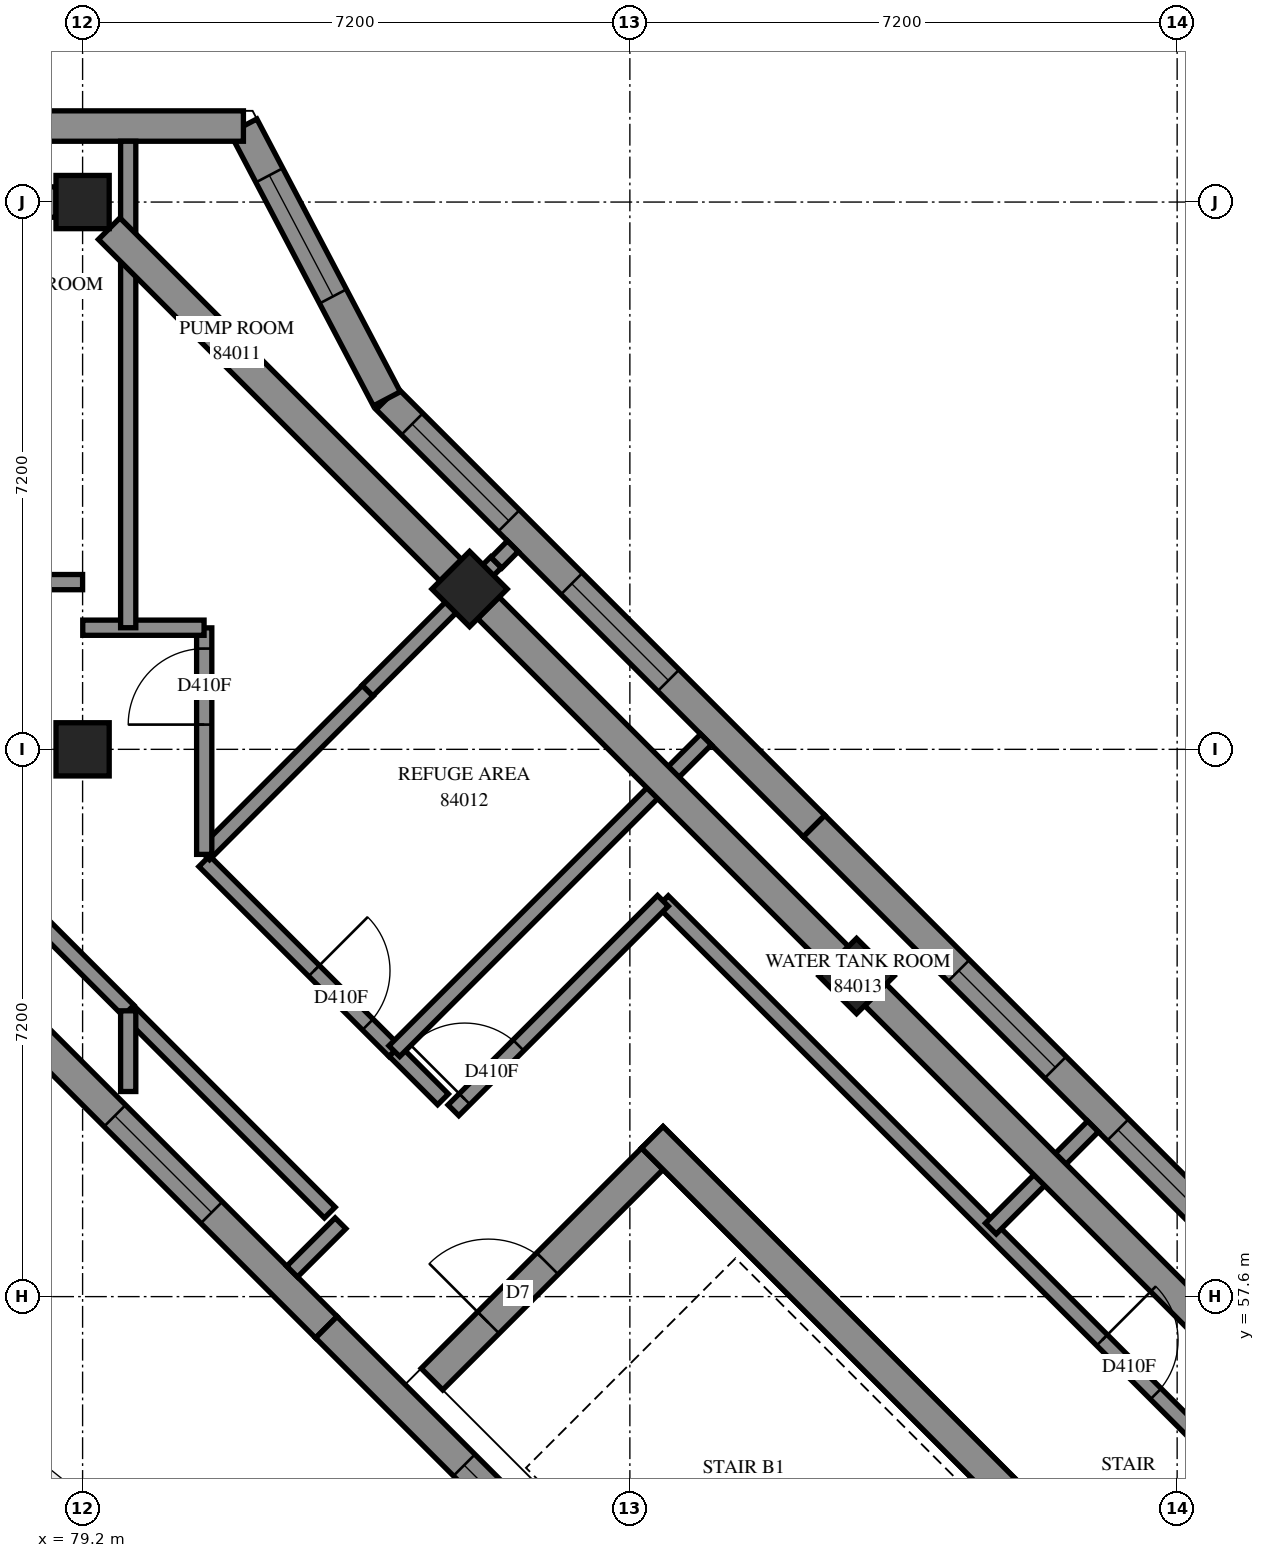
"""IFC4 building model, lengths in metres.
Left out: names, types, materials, properties, quantities, classifications, styles, units other than length and angle.
Written with IfcOpenShell. Run it as: python <this file> out.ifc"""

import sys

from ifc_helpers import new_model, si_unit, direction, frame, frame_2d, origin, origin_2d, place, context, subcontext, project, spatial, polyline, rectangle, outline, extrude, element, fill, save


model = new_model("IFC4")
c1 = context("Model", 3, precision=1e-05, world=origin(), true_north=direction((0.0, 1.0)))
c2 = subcontext(c1, "Body", "Model", "MODEL_VIEW")
j1 = project(units=[si_unit("LENGTHUNIT", "METRE"), si_unit("PLANEANGLEUNIT", "RADIAN")], contexts=[c1])
p1 = place(None, origin())
s1 = spatial("IfcSite", under=j1, at=p1, CompositionType="ELEMENT")
p2 = place(p1, origin())
s2 = spatial("IfcBuilding", under=s1, at=p2, CompositionType="ELEMENT")
p3 = place(p2, frame((0.0, 0.0, 309.6)))
s3 = spatial("IfcBuildingStorey", under=s2, at=p3, CompositionType="ELEMENT", Elevation=309.6)
for number, where, z_axis, x_axis in (
    (1, (79.2, 64.8, 0.0), (0.0, 0.0, 1.0), (1.0, 0.0, 0.0)),
    (2, (79.2, 72.0, 0.0), (0.0, 0.0, 1.0), (1.0, 0.0, 0.0)),
    (3, (84.291, 66.909, 0.0), (0.0, 0.0, 1.0), (0.707, -0.707, 0.0)),
    (4, (89.382, 61.818, 0.0), (0.0, 0.0, 1.0), (0.707, -0.707, 0.0)),
):
    element("IfcColumn", number, at=place(p3, frame(where, z_axis=z_axis, x_axis=x_axis)), inside=s3, PredefinedType="COLUMN", context=c2, shape_type="SweptSolid", body=[
        extrude(rectangle(XDim=0.7, YDim=0.7, at=origin_2d()), origin(), (0.0, 0.0, 1.0), 3.5),
    ])
p4 = place(p3, frame((86.695, 59.696, -0.3), z_axis=(0.0, 0.0, 1.0), x_axis=(0.7071100706, -0.7071034917, 0.0)))
e5 = element("IfcWall", 5, at=p4, inside=s3, PredefinedType="SHEAR", context=c2, shape_type="SweptSolid", body=[
    extrude(outline(polyline([(0.0, 0.0), (15.2, 0.0), (15.2, 3.1), (0.0, 3.1), (0.0, 0.0)])), frame((0.0, 0.2, 0.0), z_axis=(0.0, -1.0, 0.0), x_axis=(1.0, 0.0, 0.0)), (0.0, 0.0, 1.0), 0.4),
])
p5 = place(p4, frame((10.4, 0.0, 0.3)))
e6 = element("IfcOpeningElement", 6, at=p5, cuts=e5, PredefinedType="OPENING", context=c2, shape_type="SweptSolid", body=[
    extrude(rectangle(XDim=0.8, YDim=2.1, at=frame_2d((0.4, 1.05))), frame((0.0, 0.21, 0.0), z_axis=(0.0, -1.0, 0.0), x_axis=(1.0, 0.0, 0.0)), (0.0, 0.0, 1.0), 0.42),
])
p6 = place(p3, frame((83.796, 56.514, -0.3), z_axis=(0.0, 0.0, 1.0), x_axis=(0.7071067812, 0.7071067812, 0.0)))
e7 = element("IfcWall", 7, at=p6, inside=s3, PredefinedType="SHEAR", context=c2, shape_type="SweptSolid", body=[
    extrude(outline(polyline([(0.0, 0.0), (4.1, 0.0), (4.1, 3.1), (0.0, 3.1), (0.0, 0.0)])), frame((0.0, 0.2, 0.0), z_axis=(0.0, -1.0, 0.0), x_axis=(1.0, 0.0, 0.0)), (0.0, 0.0, 1.0), 0.4),
])
p7 = place(p6, frame((1.05, 0.0, 0.3)))
e8 = element("IfcOpeningElement", 8, at=p7, cuts=e7, PredefinedType="OPENING", context=c2, shape_type="SweptSolid", body=[
    extrude(rectangle(XDim=1.1, YDim=2.1, at=frame_2d((0.55, 1.05))), frame((0.0, 0.21, 0.0), z_axis=(0.0, -1.0, 0.0), x_axis=(1.0, 0.0, 0.0)), (0.0, 0.0, 1.0), 0.42),
])
p8 = place(p3, frame((94.42, 58.194, 0.0), z_axis=(0.0, 0.0, 1.0), x_axis=(-0.7071067812, 0.7071067812, 0.0)))
e9 = element("IfcWall", 9, at=p8, inside=s3, PredefinedType="SOLIDWALL", context=c2, shape_type="SweptSolid", body=[
    extrude(outline(polyline([(0.0, -0.2), (7.917, -0.2), (7.917, 0.2), (0.0, 0.2), (0.0, -0.2)])), origin(), (0.0, 0.0, 1.0), 3.5),
])
p9 = place(p8, frame((0.462, 0.0, 0.7)))
e10 = element("IfcOpeningElement", 10, at=p9, cuts=e9, PredefinedType="OPENING", context=c2, shape_type="SweptSolid", body=[
    extrude(rectangle(XDim=1.8, YDim=2.2, at=frame_2d((0.9, 1.1))), frame((0.0, 0.21, 0.0), z_axis=(0.0, -1.0, 0.0), x_axis=(1.0, 0.0, 0.0)), (0.0, 0.0, 1.0), 0.42),
])
p10 = place(p8, frame((3.425, 0.0, 0.7)))
e11 = element("IfcOpeningElement", 11, at=p10, cuts=e9, PredefinedType="OPENING", context=c2, shape_type="SweptSolid", body=[
    extrude(rectangle(XDim=1.8, YDim=2.2, at=frame_2d((0.9, 1.1))), frame((0.0, 0.21, 0.0), z_axis=(0.0, -1.0, 0.0), x_axis=(1.0, 0.0, 0.0)), (0.0, 0.0, 1.0), 0.42),
])
p11 = place(p3, frame((88.822, 63.792, 0.0), z_axis=(0.0, 0.0, 1.0), x_axis=(-0.7071130728, 0.7071004896, 0.0)))
e12 = element("IfcWall", 12, at=p11, inside=s3, PredefinedType="SOLIDWALL", context=c2, shape_type="SweptSolid", body=[
    extrude(outline(polyline([(0.0, -0.2), (7.917, -0.2), (7.978, 0.2), (0.0, 0.2), (0.0, -0.2)])), origin(), (0.0, 0.0, 1.0), 3.5),
])
p12 = place(p11, frame((2.708, 0.0, 0.7)))
e13 = element("IfcOpeningElement", 13, at=p12, cuts=e12, PredefinedType="OPENING", context=c2, shape_type="SweptSolid", body=[
    extrude(rectangle(XDim=1.8, YDim=2.2, at=frame_2d((0.9, 1.1))), frame((0.0, 0.21, 0.0), z_axis=(0.0, -1.0, 0.0), x_axis=(1.0, 0.0, 0.0)), (0.0, 0.0, 1.0), 0.42),
])
p13 = place(p11, frame((5.678, 0.0, 0.7)))
e14 = element("IfcOpeningElement", 14, at=p13, cuts=e12, PredefinedType="OPENING", context=c2, shape_type="SweptSolid", body=[
    extrude(rectangle(XDim=1.8, YDim=2.2, at=frame_2d((0.9, 1.1))), frame((0.0, 0.21, 0.0), z_axis=(0.0, -1.0, 0.0), x_axis=(1.0, 0.0, 0.0)), (0.0, 0.0, 1.0), 0.42),
])
p14 = place(p3, frame((83.203, 69.411, 0.0), z_axis=(0.0, 0.0, 1.0), x_axis=(-0.465420108, 0.8850898955, 0.0)))
e15 = element("IfcWall", 15, at=p14, inside=s3, PredefinedType="SOLIDWALL", context=c2, shape_type="SweptSolid", body=[
    extrude(outline(polyline([(0.03, -0.2), (4.175, -0.2), (3.934, 0.2), (-0.03, 0.2), (0.03, -0.2)])), origin(), (0.0, 0.0, 1.0), 3.5),
])
p15 = place(p14, frame((1.522, 0.0, 0.7)))
e16 = element("IfcOpeningElement", 16, at=p15, cuts=e15, PredefinedType="OPENING", context=c2, shape_type="SweptSolid", body=[
    extrude(rectangle(XDim=1.8, YDim=2.2, at=frame_2d((0.9, 1.1))), frame((0.0, 0.21, 0.0), z_axis=(0.0, -1.0, 0.0), x_axis=(1.0, 0.0, 0.0)), (0.0, 0.0, 1.0), 0.42),
])
p16 = place(p3, frame((81.316, 73.0, 0.0), z_axis=(0.0, 0.0, 1.0), x_axis=(-1.0, 0.0, 0.0)))
e17 = element("IfcWall", 17, at=p16, inside=s3, PredefinedType="SOLIDWALL", context=c2, shape_type="SweptSolid", body=[
    extrude(outline(polyline([(-0.121, -0.2), (11.749, -0.2), (11.349, 0.2), (0.121, 0.2), (-0.121, -0.2)])), origin(), (0.0, 0.0, 1.0), 3.5),
])
p17 = place(p16, frame((3.166, 0.0, 0.7)))
e18 = element("IfcOpeningElement", 18, at=p17, cuts=e17, PredefinedType="OPENING", context=c2, shape_type="SweptSolid", body=[
    extrude(rectangle(XDim=1.8, YDim=2.2, at=frame_2d((0.9, 1.1))), frame((0.0, 0.21, 0.0), z_axis=(0.0, -1.0, 0.0), x_axis=(1.0, 0.0, 0.0)), (0.0, 0.0, 1.0), 0.42),
])
p18 = place(p16, frame((6.416, 0.0, 0.7)))
e19 = element("IfcOpeningElement", 19, at=p18, cuts=e17, PredefinedType="OPENING", context=c2, shape_type="SweptSolid", body=[
    extrude(rectangle(XDim=1.8, YDim=2.2, at=frame_2d((0.9, 1.1))), frame((0.0, 0.21, 0.0), z_axis=(0.0, -1.0, 0.0), x_axis=(1.0, 0.0, 0.0)), (0.0, 0.0, 1.0), 0.42),
])
p19 = place(p3, frame((77.439, 62.164, 0.0), z_axis=(0.0, 0.0, 1.0), x_axis=(0.7071067812, -0.7071067812, 0.0)))
e20 = element("IfcWall", 20, at=p19, inside=s3, PredefinedType="SOLIDWALL", context=c2, shape_type="SweptSolid", body=[
    extrude(outline(polyline([(0.034, -0.2), (7.024, -0.2), (7.024, 0.2), (-0.034, 0.2), (0.034, -0.2)])), origin(), (0.0, 0.0, 1.0), 3.5),
])
p20 = place(p19, frame((3.09, 0.0, 0.7)))
e21 = element("IfcOpeningElement", 21, at=p20, cuts=e20, PredefinedType="OPENING", context=c2, shape_type="SweptSolid", body=[
    extrude(rectangle(XDim=1.8, YDim=2.2, at=frame_2d((0.9, 1.1))), frame((0.0, 0.21, 0.0), z_axis=(0.0, -1.0, 0.0), x_axis=(1.0, 0.0, 0.0)), (0.0, 0.0, 1.0), 0.42),
])
p21 = place(p3, frame((82.406, 57.197, 0.0), z_axis=(0.0, 0.0, 1.0), x_axis=(0.7071067812, -0.7071067812, 0.0)))
e22 = element("IfcWall", 22, at=p21, inside=s3, PredefinedType="SOLIDWALL", context=c2, shape_type="SweptSolid", body=[
    extrude(outline(polyline([(0.0, -0.2), (6.99, -0.2), (6.99, 0.2), (0.0, 0.2), (0.0, -0.2)])), origin(), (0.0, 0.0, 1.0), 3.5),
])
p22 = place(p21, frame((2.565, 0.0, 0.7)))
e23 = element("IfcOpeningElement", 23, at=p22, cuts=e22, PredefinedType="OPENING", context=c2, shape_type="SweptSolid", body=[
    extrude(rectangle(XDim=1.8, YDim=2.2, at=frame_2d((0.9, 1.1))), frame((0.0, 0.21, 0.0), z_axis=(0.0, -1.0, 0.0), x_axis=(1.0, 0.0, 0.0)), (0.0, 0.0, 1.0), 0.42),
])
p23 = place(p3, frame((86.835, 62.803, 0.0), z_axis=(0.0, 0.0, 1.0), x_axis=(0.7072045346, -0.7070090143, 0.0)))
e24 = element("IfcWall", 24, at=p23, inside=s3, PredefinedType="PARTITIONING", context=c2, shape_type="SweptSolid", body=[
    extrude(rectangle(XDim=13.298, YDim=0.2, at=frame_2d((6.649, 0.0))), origin(), (0.0, 0.0, 1.0), 3.5),
])
p24 = place(p23, frame((8.169, 0.0, 0.0)))
e25 = element("IfcOpeningElement", 25, at=p24, cuts=e24, PredefinedType="OPENING", context=c2, shape_type="SweptSolid", body=[
    extrude(rectangle(XDim=1.0, YDim=2.1, at=frame_2d((0.5, 1.05))), frame((0.0, 0.11, 0.0), z_axis=(0.0, -1.0, 0.0), x_axis=(1.0, 0.0, 0.0)), (0.0, 0.0, 1.0), 0.22),
])
p25 = place(p3, frame((84.079, 60.051, 0.0), z_axis=(0.0, 0.0, 1.0), x_axis=(0.7071067812, 0.7071067812, 0.0)))
e26 = element("IfcWall", 26, at=p25, inside=s3, PredefinedType="PARTITIONING", context=c2, shape_type="SweptSolid", body=[
    extrude(rectangle(XDim=3.898, YDim=0.2, at=frame_2d((1.949, 0.0))), origin(), (0.0, 0.0, 1.0), 3.5),
])
p26 = place(p25, frame((0.209, 0.0, 0.0)))
e27 = element("IfcOpeningElement", 27, at=p26, cuts=e26, PredefinedType="OPENING", context=c2, shape_type="SweptSolid", body=[
    extrude(rectangle(XDim=1.0, YDim=2.1, at=frame_2d((0.5, 1.05))), frame((0.0, 0.11, 0.0), z_axis=(0.0, -1.0, 0.0), x_axis=(1.0, 0.0, 0.0)), (0.0, 0.0, 1.0), 0.22),
])
p27 = place(p3, frame((79.8, 61.36, 0.0), z_axis=(0.0, 0.0, 1.0), x_axis=(0.7068402, -0.707373262, 0.0)))
e28 = element("IfcWall", 28, at=p27, inside=s3, PredefinedType="PARTITIONING", context=c2, shape_type="SweptSolid", body=[
    extrude(rectangle(XDim=3.752, YDim=0.2, at=frame_2d((1.876, 0.0))), origin(), (0.0, 0.0, 1.0), 3.5),
])
p28 = place(p3, frame((80.801, 63.329, 0.0), z_axis=(0.0, 0.0, 1.0), x_axis=(0.7073894543, -0.7068239951, 0.0)))
e29 = element("IfcWall", 29, at=p28, inside=s3, PredefinedType="PARTITIONING", context=c2, shape_type="SweptSolid", body=[
    extrude(rectangle(XDim=3.537, YDim=0.2, at=frame_2d((1.768, 0.0))), origin(), (0.0, 0.0, 1.0), 3.5),
])
p29 = place(p28, frame((2.041, 0.0, 0.0)))
e30 = element("IfcOpeningElement", 30, at=p29, cuts=e29, PredefinedType="OPENING", context=c2, shape_type="SweptSolid", body=[
    extrude(rectangle(XDim=1.0, YDim=2.1, at=frame_2d((0.5, 1.05))), frame((0.0, 0.11, 0.0), z_axis=(0.0, -1.0, 0.0), x_axis=(1.0, 0.0, 0.0)), (0.0, 0.0, 1.0), 0.22),
])
p30 = place(p3, frame((80.799, 63.419, 0.0), z_axis=(0.0, 0.0, 1.0), x_axis=(0.7071067812, 0.7071067812, 0.0)))
e31 = element("IfcWall", 31, at=p30, inside=s3, PredefinedType="PARTITIONING", context=c2, shape_type="SweptSolid", body=[
    extrude(rectangle(XDim=3.043, YDim=0.2, at=frame_2d((1.522, 0.0))), origin(), (0.0, 0.0, 1.0), 3.5),
])
p31 = place(p3, frame((80.8, 63.418, 0.0), z_axis=(0.0, 0.0, 1.0), x_axis=(0.0, 1.0, 0.0)))
e32 = element("IfcWall", 32, at=p31, inside=s3, PredefinedType="PARTITIONING", context=c2, shape_type="SweptSolid", body=[
    extrude(rectangle(XDim=2.98, YDim=0.2, at=frame_2d((1.49, 0.0))), origin(), (0.0, 0.0, 1.0), 3.5),
])
p32 = place(p31, frame((1.708, 0.0, 0.0)))
e33 = element("IfcOpeningElement", 33, at=p32, cuts=e32, PredefinedType="OPENING", context=c2, shape_type="SweptSolid", body=[
    extrude(rectangle(XDim=1.0, YDim=2.1, at=frame_2d((0.5, 1.05))), frame((0.0, 0.11, 0.0), z_axis=(0.0, -1.0, 0.0), x_axis=(1.0, 0.0, 0.0)), (0.0, 0.0, 1.0), 0.22),
])
p33 = place(p3, frame((77.603, 63.563, 0.0), z_axis=(0.0, 0.0, 1.0), x_axis=(0.7071067812, -0.7071067812, 0.0)))
e34 = element("IfcWall", 34, at=p33, inside=s3, PredefinedType="PARTITIONING", context=c2, shape_type="SweptSolid", body=[
    extrude(rectangle(XDim=3.111, YDim=0.2, at=frame_2d((1.556, 0.0))), origin(), (0.0, 0.0, 1.0), 3.5),
])
p34 = place(p3, frame((77.13, 67.0, 0.0), z_axis=(0.0, 0.0, 1.0), x_axis=(1.0, 0.0, 0.0)))
e35 = element("IfcWall", 35, at=p34, inside=s3, PredefinedType="PARTITIONING", context=c2, shape_type="SweptSolid", body=[
    extrude(rectangle(XDim=2.07, YDim=0.2, at=frame_2d((1.035, 0.0))), origin(), (0.0, 0.0, 1.0), 3.5),
])
p35 = place(p3, frame((79.8, 60.298, 0.0), z_axis=(0.0, 0.0, 1.0), x_axis=(0.0, 1.0, 0.0)))
e36 = element("IfcWall", 36, at=p35, inside=s3, PredefinedType="PARTITIONING", context=c2, shape_type="SweptSolid", body=[
    extrude(rectangle(XDim=1.062, YDim=0.2, at=frame_2d((0.531, 0.0))), origin(), (0.0, 0.0, 1.0), 3.5),
])
p36 = place(p3, frame((79.202, 66.4, 0.0), z_axis=(0.0, 0.0, 1.0), x_axis=(1.0, 0.0, 0.0)))
e37 = element("IfcWall", 37, at=p36, inside=s3, PredefinedType="PARTITIONING", context=c2, shape_type="SweptSolid", body=[
    extrude(rectangle(XDim=1.596, YDim=0.2, at=frame_2d((0.798, 0.0))), origin(), (0.0, 0.0, 1.0), 3.5),
])
p37 = place(p3, frame((82.949, 65.573, 0.0), z_axis=(0.0, 0.0, 1.0), x_axis=(0.7078390676, 0.7063737356, 0.0)))
e38 = element("IfcWall", 38, at=p37, inside=s3, PredefinedType="PARTITIONING", context=c2, shape_type="SweptSolid", body=[
    extrude(rectangle(XDim=2.389, YDim=0.2, at=frame_2d((1.194, 0.0))), origin(), (0.0, 0.0, 1.0), 3.5),
])
p38 = place(p3, frame((83.305, 60.831, 0.0), z_axis=(0.0, 0.0, 1.0), x_axis=(0.7071067812, -0.7071067812, 0.0)))
e39 = element("IfcWall", 39, at=p38, inside=s3, PredefinedType="PARTITIONING", context=c2, shape_type="SweptSolid", body=[
    extrude(rectangle(XDim=0.899, YDim=0.2, at=frame_2d((0.45, 0.0))), origin(), (0.0, 0.0, 1.0), 3.5),
])
p39 = place(p3, frame((79.8, 66.4, 0.0), z_axis=(0.0, 0.0, 1.0), x_axis=(0.0, 1.0, 0.0)))
e40 = element("IfcWall", 40, at=p39, inside=s3, PredefinedType="PARTITIONING", context=c2, shape_type="SweptSolid", body=[
    extrude(outline(polyline([(0.0, -0.1), (6.4, -0.1), (6.4, 0.1), (0.0, 0.1), (0.0, -0.1)])), origin(), (0.0, 0.0, 1.0), 3.5),
])
p40 = place(p3, frame((83.301, 60.829, 0.0), z_axis=(0.0, 0.0, 1.0), x_axis=(0.7071067812, 0.7071067812, 0.0)))
e41 = element("IfcWall", 41, at=p40, inside=s3, PredefinedType="PARTITIONING", context=c2, shape_type="SweptSolid", body=[
    extrude(outline(polyline([(0.0, -0.1), (5.799, -0.1), (5.799, 0.1), (0.0, 0.1), (0.0, -0.1)])), origin(), (0.0, 0.0, 1.0), 3.5),
])
p41 = place(p3, frame((91.149, 58.495, 0.0), z_axis=(0.0, 0.0, 1.0), x_axis=(0.7071067812, 0.7071067812, 0.0)))
e42 = element("IfcWall", 42, at=p41, inside=s3, PredefinedType="PARTITIONING", context=c2, shape_type="SweptSolid", body=[
    extrude(outline(polyline([(0.0, -0.1), (1.9, -0.1), (1.9, 0.1), (0.0, 0.1), (0.0, -0.1)])), origin(), (0.0, 0.0, 1.0), 3.5),
])
p42 = place(p3, frame((81.957, 57.93, 0.0), z_axis=(0.0, 0.0, 1.0), x_axis=(0.7079403378, 0.7062722408, 0.0)))
e43 = element("IfcWall", 43, at=p42, inside=s3, PredefinedType="PARTITIONING", context=c2, shape_type="SweptSolid", body=[
    extrude(outline(polyline([(0.0, -0.1), (0.899, -0.1), (0.899, 0.1), (0.0, 0.1), (0.0, -0.1)])), origin(), (0.0, 0.0, 1.0), 3.5),
])
p43 = place(p3, frame((84.645, 67.255, 0.0), z_axis=(0.0, 0.0, 1.0), x_axis=(0.7053018997, 0.7089070674, 0.0)))
e44 = element("IfcWall", 44, at=p43, inside=s3, PredefinedType="PARTITIONING", context=c2, shape_type="SweptSolid", body=[
    extrude(outline(polyline([(0.0, -0.1), (0.305, -0.1), (0.305, 0.1), (0.0, 0.1), (0.0, -0.1)])), origin(), (0.0, 0.0, 1.0), 3.5),
])
p44 = place(p9, origin())
e45 = element("IfcWindow", 45, at=p44, inside=s3, PartitioningType="SINGLE_PANEL", PredefinedType="WINDOW", context=c2, shape_type="SweptSolid", body=[
    extrude(rectangle(XDim=1.8, YDim=2.2, at=frame_2d((0.9, 1.1))), frame((0.0, 0.08, 0.0), z_axis=(0.0, -1.0, 0.0), x_axis=(1.0, 0.0, 0.0)), (0.0, 0.0, 1.0), 0.06),
])
fill(e10, e45)
p45 = place(p10, origin())
e46 = element("IfcWindow", 46, at=p45, inside=s3, PartitioningType="SINGLE_PANEL", PredefinedType="WINDOW", context=c2, shape_type="SweptSolid", body=[
    extrude(rectangle(XDim=1.8, YDim=2.2, at=frame_2d((0.9, 1.1))), frame((0.0, 0.08, 0.0), z_axis=(0.0, -1.0, 0.0), x_axis=(1.0, 0.0, 0.0)), (0.0, 0.0, 1.0), 0.06),
])
fill(e11, e46)
p46 = place(p12, origin())
e47 = element("IfcWindow", 47, at=p46, inside=s3, PartitioningType="SINGLE_PANEL", PredefinedType="WINDOW", context=c2, shape_type="SweptSolid", body=[
    extrude(rectangle(XDim=1.8, YDim=2.2, at=frame_2d((0.9, 1.1))), frame((0.0, 0.08, 0.0), z_axis=(0.0, -1.0, 0.0), x_axis=(1.0, 0.0, 0.0)), (0.0, 0.0, 1.0), 0.06),
])
fill(e13, e47)
p47 = place(p13, origin())
e48 = element("IfcWindow", 48, at=p47, inside=s3, PartitioningType="SINGLE_PANEL", PredefinedType="WINDOW", context=c2, shape_type="SweptSolid", body=[
    extrude(rectangle(XDim=1.8, YDim=2.2, at=frame_2d((0.9, 1.1))), frame((0.0, 0.08, 0.0), z_axis=(0.0, -1.0, 0.0), x_axis=(1.0, 0.0, 0.0)), (0.0, 0.0, 1.0), 0.06),
])
fill(e14, e48)
p48 = place(p15, origin())
e49 = element("IfcWindow", 49, at=p48, inside=s3, PartitioningType="SINGLE_PANEL", PredefinedType="WINDOW", context=c2, shape_type="SweptSolid", body=[
    extrude(rectangle(XDim=1.8, YDim=2.2, at=frame_2d((0.9, 1.1))), frame((0.0, 0.08, 0.0), z_axis=(0.0, -1.0, 0.0), x_axis=(1.0, 0.0, 0.0)), (0.0, 0.0, 1.0), 0.06),
])
fill(e16, e49)
p49 = place(p20, origin())
e50 = element("IfcWindow", 50, at=p49, inside=s3, PartitioningType="SINGLE_PANEL", PredefinedType="WINDOW", context=c2, shape_type="SweptSolid", body=[
    extrude(rectangle(XDim=1.8, YDim=2.2, at=frame_2d((0.9, 1.1))), frame((0.0, 0.08, 0.0), z_axis=(0.0, -1.0, 0.0), x_axis=(1.0, 0.0, 0.0)), (0.0, 0.0, 1.0), 0.06),
])
fill(e21, e50)
p50 = place(p22, origin())
e51 = element("IfcWindow", 51, at=p50, inside=s3, PartitioningType="SINGLE_PANEL", PredefinedType="WINDOW", context=c2, shape_type="SweptSolid", body=[
    extrude(rectangle(XDim=1.8, YDim=2.2, at=frame_2d((0.9, 1.1))), frame((0.0, 0.08, 0.0), z_axis=(0.0, -1.0, 0.0), x_axis=(1.0, 0.0, 0.0)), (0.0, 0.0, 1.0), 0.06),
])
fill(e23, e51)
p51 = place(p7, origin())
e52 = element("IfcDoor", 52, at=p51, inside=s3, OperationType="SINGLE_SWING_LEFT", PredefinedType="DOOR", context=c2, shape_type="SweptSolid", body=[
    extrude(rectangle(XDim=1.1, YDim=2.1, at=frame_2d((0.55, 1.05))), frame((0.0, 0.025, 0.0), z_axis=(0.0, -1.0, 0.0), x_axis=(1.0, 0.0, 0.0)), (0.0, 0.0, 1.0), 0.05),
])
fill(e8, e52)
p52 = place(p32, origin())
e53 = element("IfcDoor", 53, at=p52, inside=s3, OperationType="SINGLE_SWING_RIGHT", PredefinedType="DOOR", context=c2, shape_type="SweptSolid", body=[
    extrude(rectangle(XDim=1.0, YDim=2.1, at=frame_2d((0.5, 1.05))), frame((0.0, 0.025, 0.0), z_axis=(0.0, -1.0, 0.0), x_axis=(1.0, 0.0, 0.0)), (0.0, 0.0, 1.0), 0.05),
])
fill(e33, e53)
p53 = place(p29, origin())
e54 = element("IfcDoor", 54, at=p53, inside=s3, OperationType="SINGLE_SWING_LEFT", PredefinedType="DOOR", context=c2, shape_type="SweptSolid", body=[
    extrude(rectangle(XDim=1.0, YDim=2.1, at=frame_2d((0.5, 1.05))), frame((0.0, 0.025, 0.0), z_axis=(0.0, -1.0, 0.0), x_axis=(1.0, 0.0, 0.0)), (0.0, 0.0, 1.0), 0.05),
])
fill(e30, e54)
p54 = place(p26, origin())
e55 = element("IfcDoor", 55, at=p54, inside=s3, OperationType="SINGLE_SWING_RIGHT", PredefinedType="DOOR", context=c2, shape_type="SweptSolid", body=[
    extrude(rectangle(XDim=1.0, YDim=2.1, at=frame_2d((0.5, 1.05))), frame((0.0, 0.025, 0.0), z_axis=(0.0, -1.0, 0.0), x_axis=(1.0, 0.0, 0.0)), (0.0, 0.0, 1.0), 0.05),
])
fill(e27, e55)
p55 = place(p24, origin())
e56 = element("IfcDoor", 56, at=p55, inside=s3, OperationType="SINGLE_SWING_RIGHT", PredefinedType="DOOR", context=c2, shape_type="SweptSolid", body=[
    extrude(rectangle(XDim=1.0, YDim=2.1, at=frame_2d((0.5, 1.05))), frame((0.0, 0.025, 0.0), z_axis=(0.0, -1.0, 0.0), x_axis=(1.0, 0.0, 0.0)), (0.0, 0.0, 1.0), 0.05),
])
fill(e25, e56)
save(model, sys.argv[1])
